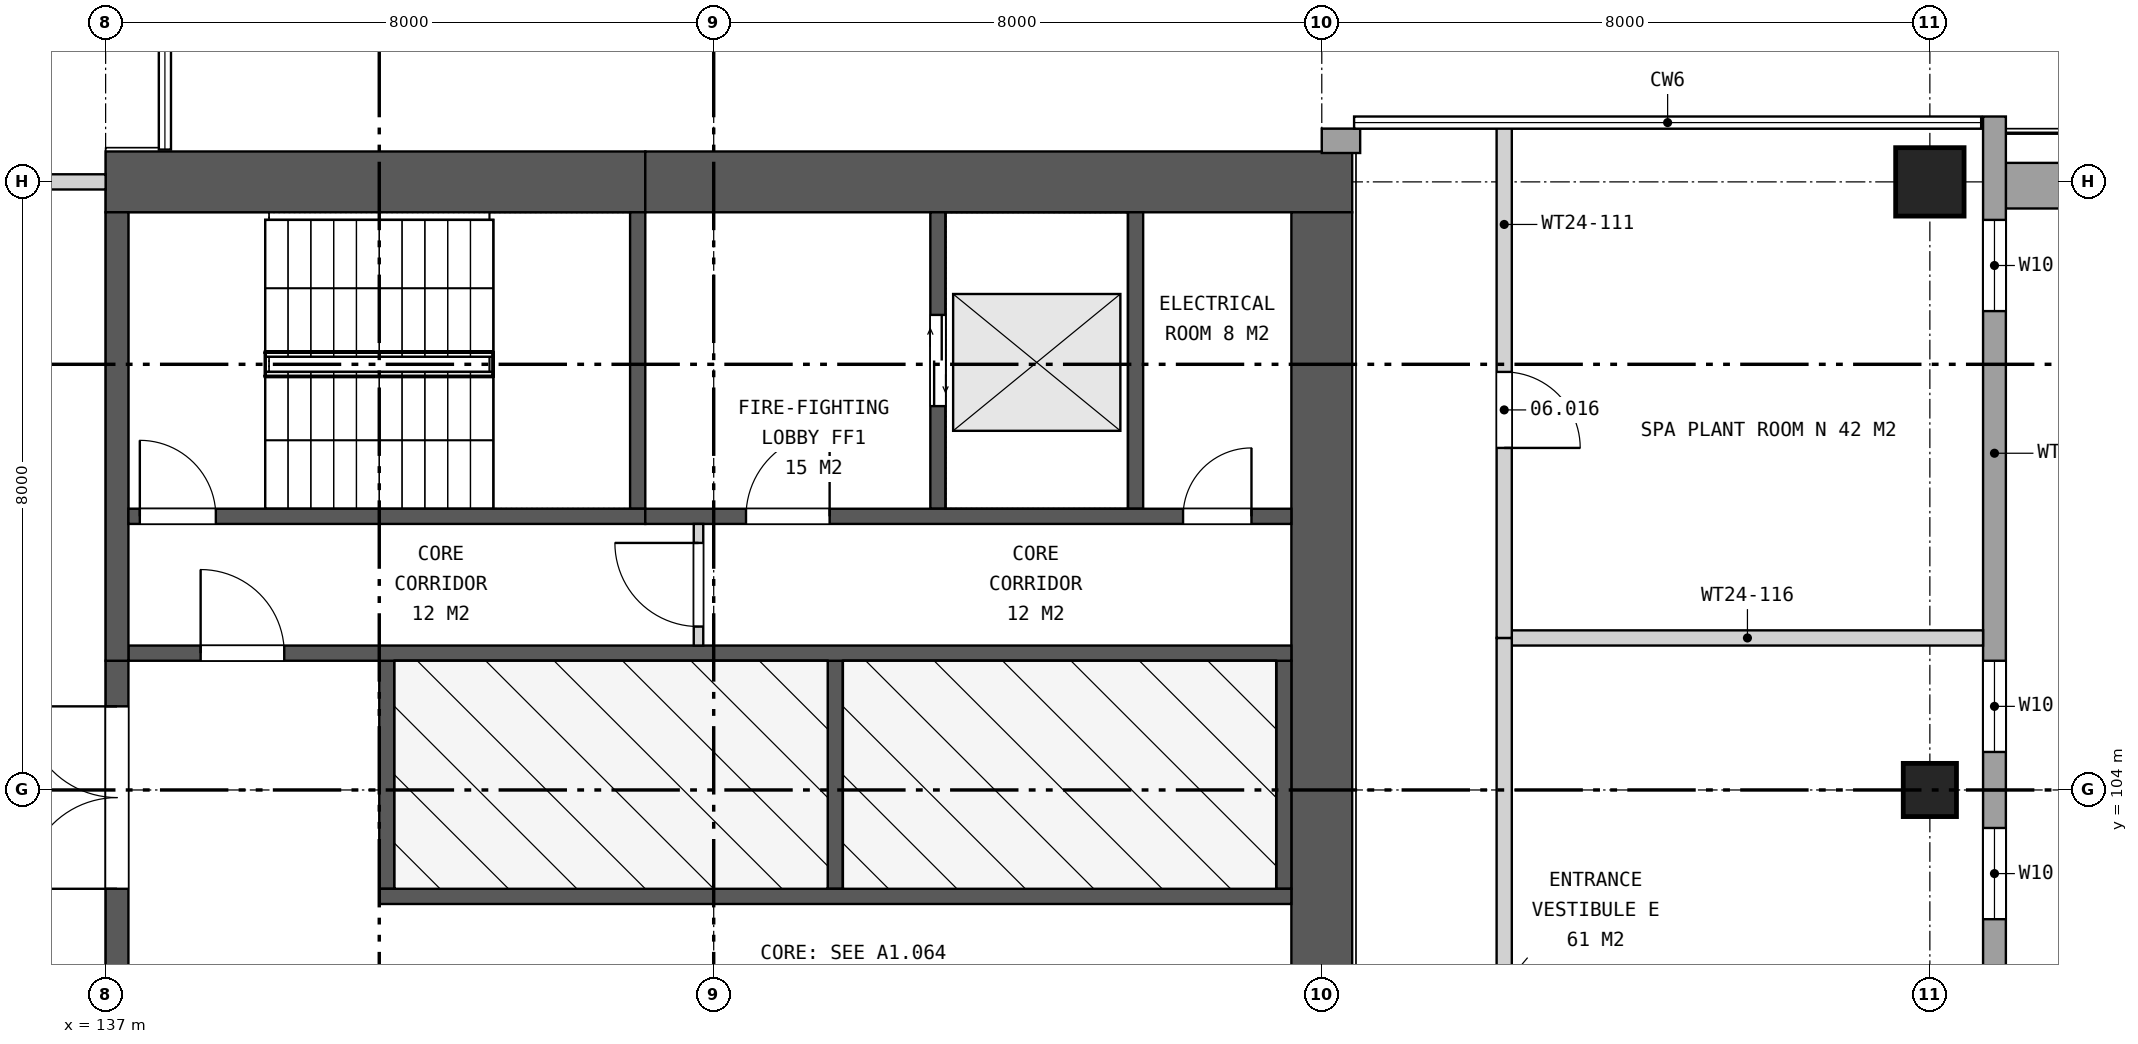
"""IFC4 building model, lengths in metres.
Left out: names, types, materials, properties, quantities, classifications, styles, units other than length and angle.
Written with IfcOpenShell. Run it as: python <this file> out.ifc"""

import sys

from ifc_helpers import new_model, si_unit, direction, frame, frame_2d, origin, origin_2d, place, context, subcontext, project, spatial, rectangle, extrude, element, fill, save


model = new_model("IFC4")
c1 = context("Model", 3, precision=1e-05, world=origin(), true_north=direction((0.0, 1.0)))
c2 = subcontext(c1, "Body", "Model", "MODEL_VIEW")
j1 = project(units=[si_unit("LENGTHUNIT", "METRE"), si_unit("PLANEANGLEUNIT", "RADIAN")], contexts=[c1])
p1 = place(None, origin())
s1 = spatial("IfcSite", under=j1, at=p1, CompositionType="ELEMENT")
p2 = place(p1, origin())
s2 = spatial("IfcBuilding", under=s1, at=p2, CompositionType="ELEMENT")
p3 = place(p2, frame((0.0, 0.0, 47.5)))
s3 = spatial("IfcBuildingStorey", under=s2, at=p3, CompositionType="ELEMENT", Elevation=47.5)
p4 = place(p3, frame((161.0, 112.0, 0.0), z_axis=(0.0, 0.0, 1.0), x_axis=(1.0, 0.0, 0.0)))
e1 = element("IfcColumn", 1, at=p4, inside=s3, PredefinedType="COLUMN", context=c2, shape_type="SweptSolid", body=[
    extrude(rectangle(XDim=0.9, YDim=0.9, at=origin_2d()), origin(), (0.0, 0.0, 1.0), 6.0),
])
p5 = place(p3, frame((161.0, 104.0, 5.2), z_axis=(0.0, 0.0, 1.0), x_axis=(1.0, 0.0, 0.0)))
e2 = element("IfcColumn", 2, at=p5, inside=s3, PredefinedType="COLUMN", context=c2, shape_type="SweptSolid", body=[
    extrude(rectangle(XDim=0.7, YDim=0.7, at=origin_2d()), origin(), (0.0, 0.0, 1.0), 0.8),
])
p6 = place(p3, frame((137.0, 112.0, 0.0), z_axis=(0.0, 0.0, 1.0), x_axis=(1.0, 0.0, 0.0)))
e3 = element("IfcWall", 3, at=p6, inside=s3, PredefinedType="SHEAR", context=c2, shape_type="SweptSolid", body=[
    extrude(rectangle(XDim=7.1, YDim=0.8, at=frame_2d((3.55, 0.0))), origin(), (0.0, 0.0, 1.0), 6.0),
])
p7 = place(p3, frame((144.1, 112.0, 0.0), z_axis=(0.0, 0.0, 1.0), x_axis=(1.0, 0.0, 0.0)))
e4 = element("IfcWall", 4, at=p7, inside=s3, PredefinedType="SHEAR", context=c2, shape_type="SweptSolid", body=[
    extrude(rectangle(XDim=9.3, YDim=0.8, at=frame_2d((4.65, 0.0))), origin(), (0.0, 0.0, 1.0), 6.0),
])
p8 = place(p3, frame((153.0, 88.4, 0.0), z_axis=(0.0, 0.0, 1.0), x_axis=(0.0, 1.0, 0.0)))
e5 = element("IfcWall", 5, at=p8, inside=s3, PredefinedType="SHEAR", context=c2, shape_type="SweptSolid", body=[
    extrude(rectangle(XDim=23.2, YDim=0.8, at=frame_2d((11.6, 0.0))), origin(), (0.0, 0.0, 1.0), 6.0),
])
p9 = place(p8, frame((10.4, 0.0, 0.0)))
e6 = element("IfcOpeningElement", 6, at=p9, cuts=e5, PredefinedType="OPENING", context=c2, shape_type="SweptSolid", body=[
    extrude(rectangle(XDim=2.4, YDim=2.4, at=frame_2d((1.2, 1.2))), frame((0.0, 0.41, 0.0), z_axis=(0.0, -1.0, 0.0), x_axis=(1.0, 0.0, 0.0)), (0.0, 0.0, 1.0), 0.82),
])
p10 = place(p3, frame((137.15, 94.3, 0.0), z_axis=(0.0, 0.0, 1.0), x_axis=(0.0, 1.0, 0.0)))
e7 = element("IfcWall", 7, at=p10, inside=s3, PredefinedType="SHEAR", context=c2, shape_type="SweptSolid", body=[
    extrude(rectangle(XDim=11.4, YDim=0.3, at=frame_2d((5.7, 0.0))), origin(), (0.0, 0.0, 1.0), 6.0),
])
p11 = place(p10, frame((0.6, 0.0, 0.0)))
e8 = element("IfcOpeningElement", 8, at=p11, cuts=e7, PredefinedType="OPENING", context=c2, shape_type="SweptSolid", body=[
    extrude(rectangle(XDim=2.4, YDim=2.4, at=frame_2d((1.2, 1.2))), frame((0.0, 0.16, 0.0), z_axis=(0.0, -1.0, 0.0), x_axis=(1.0, 0.0, 0.0)), (0.0, 0.0, 1.0), 0.32),
])
p12 = place(p10, frame((4.5, 0.0, 0.0)))
e9 = element("IfcOpeningElement", 9, at=p12, cuts=e7, PredefinedType="OPENING", context=c2, shape_type="SweptSolid", body=[
    extrude(rectangle(XDim=2.4, YDim=2.4, at=frame_2d((1.2, 1.2))), frame((0.0, 0.16, 0.0), z_axis=(0.0, -1.0, 0.0), x_axis=(1.0, 0.0, 0.0)), (0.0, 0.0, 1.0), 0.32),
])
p13 = place(p10, frame((8.4, 0.0, 0.0)))
e10 = element("IfcOpeningElement", 10, at=p13, cuts=e7, PredefinedType="OPENING", context=c2, shape_type="SweptSolid", body=[
    extrude(rectangle(XDim=2.4, YDim=2.4, at=frame_2d((1.2, 1.2))), frame((0.0, 0.16, 0.0), z_axis=(0.0, -1.0, 0.0), x_axis=(1.0, 0.0, 0.0)), (0.0, 0.0, 1.0), 0.32),
])
for number, where, z_axis, x_axis in (
    (11, (140.7, 102.7, 0.0), (0.0, 0.0, 1.0), (0.0, 1.0, 0.0)),
    (12, (146.6, 102.7, 0.0), (0.0, 0.0, 1.0), (0.0, 1.0, 0.0)),
    (13, (152.5, 102.7, 0.0), (0.0, 0.0, 1.0), (0.0, 1.0, 0.0)),
):
    element("IfcWall", number, at=place(p3, frame(where, z_axis=z_axis, x_axis=x_axis)), inside=s3, PredefinedType="SHEAR", context=c2, shape_type="SweptSolid", body=[
        extrude(rectangle(XDim=3.0, YDim=0.2, at=frame_2d((1.5, 0.0))), origin(), (0.0, 0.0, 1.0), 6.0),
    ])
p14 = place(p3, frame((140.6, 102.6, 0.0), z_axis=(0.0, 0.0, 1.0), x_axis=(1.0, 0.0, 0.0)))
e14 = element("IfcWall", 14, at=p14, inside=s3, PredefinedType="SHEAR", context=c2, shape_type="SweptSolid", body=[
    extrude(rectangle(XDim=12.0, YDim=0.2, at=frame_2d((6.0, 0.0))), origin(), (0.0, 0.0, 1.0), 6.0),
])
p15 = place(p3, frame((137.3, 105.8, 0.0), z_axis=(0.0, 0.0, 1.0), x_axis=(1.0, 0.0, 0.0)))
e15 = element("IfcWall", 15, at=p15, inside=s3, PredefinedType="SHEAR", context=c2, shape_type="SweptSolid", body=[
    extrude(rectangle(XDim=15.3, YDim=0.2, at=frame_2d((7.65, 0.0))), origin(), (0.0, 0.0, 1.0), 6.0),
])
p16 = place(p15, frame((0.95, 0.0, 0.0)))
e16 = element("IfcOpeningElement", 16, at=p16, cuts=e15, PredefinedType="OPENING", context=c2, shape_type="SweptSolid", body=[
    extrude(rectangle(XDim=1.1, YDim=2.1, at=frame_2d((0.55, 1.05))), frame((0.0, 0.11, 0.0), z_axis=(0.0, -1.0, 0.0), x_axis=(1.0, 0.0, 0.0)), (0.0, 0.0, 1.0), 0.22),
])
p17 = place(p3, frame((137.15, 105.7, 0.0), z_axis=(0.0, 0.0, 1.0), x_axis=(0.0, 1.0, 0.0)))
e17 = element("IfcWall", 17, at=p17, inside=s3, PredefinedType="SHEAR", context=c2, shape_type="SweptSolid", body=[
    extrude(rectangle(XDim=5.9, YDim=0.3, at=frame_2d((2.95, 0.0))), origin(), (0.0, 0.0, 1.0), 6.0),
])
p18 = place(p3, frame((144.0, 107.7, 0.0), z_axis=(0.0, 0.0, 1.0), x_axis=(0.0, 1.0, 0.0)))
e18 = element("IfcWall", 18, at=p18, inside=s3, PredefinedType="SHEAR", context=c2, shape_type="SweptSolid", body=[
    extrude(rectangle(XDim=3.9, YDim=0.2, at=frame_2d((1.95, 0.0))), origin(), (0.0, 0.0, 1.0), 6.0),
])
p19 = place(p3, frame((147.95, 107.7, 0.0), z_axis=(0.0, 0.0, 1.0), x_axis=(0.0, 1.0, 0.0)))
e19 = element("IfcWall", 19, at=p19, inside=s3, PredefinedType="SHEAR", context=c2, shape_type="SweptSolid", body=[
    extrude(rectangle(XDim=3.9, YDim=0.2, at=frame_2d((1.95, 0.0))), origin(), (0.0, 0.0, 1.0), 6.0),
])
p20 = place(p19, frame((1.35, 0.0, 0.0)))
e20 = element("IfcOpeningElement", 20, at=p20, cuts=e19, PredefinedType="OPENING", context=c2, shape_type="SweptSolid", body=[
    extrude(rectangle(XDim=1.2, YDim=2.1, at=frame_2d((0.6, 1.05))), frame((0.0, 0.11, 0.0), z_axis=(0.0, -1.0, 0.0), x_axis=(1.0, 0.0, 0.0)), (0.0, 0.0, 1.0), 0.22),
])
p21 = place(p3, frame((150.55, 107.7, 0.0), z_axis=(0.0, 0.0, 1.0), x_axis=(0.0, 1.0, 0.0)))
e21 = element("IfcWall", 21, at=p21, inside=s3, PredefinedType="SHEAR", context=c2, shape_type="SweptSolid", body=[
    extrude(rectangle(XDim=3.9, YDim=0.2, at=frame_2d((1.95, 0.0))), origin(), (0.0, 0.0, 1.0), 6.0),
])
p22 = place(p3, frame((137.3, 107.6, 0.0), z_axis=(0.0, 0.0, 1.0), x_axis=(1.0, 0.0, 0.0)))
e22 = element("IfcWall", 22, at=p22, inside=s3, PredefinedType="SHEAR", context=c2, shape_type="SweptSolid", body=[
    extrude(rectangle(XDim=6.8, YDim=0.2, at=frame_2d((3.4, 0.0))), origin(), (0.0, 0.0, 1.0), 6.0),
])
p23 = place(p22, frame((0.15, 0.0, 0.0)))
e23 = element("IfcOpeningElement", 23, at=p23, cuts=e22, PredefinedType="OPENING", context=c2, shape_type="SweptSolid", body=[
    extrude(rectangle(XDim=1.0, YDim=2.1, at=frame_2d((0.5, 1.05))), frame((0.0, 0.11, 0.0), z_axis=(0.0, -1.0, 0.0), x_axis=(1.0, 0.0, 0.0)), (0.0, 0.0, 1.0), 0.22),
])
p24 = place(p3, frame((144.1, 107.6, 0.0), z_axis=(0.0, 0.0, 1.0), x_axis=(1.0, 0.0, 0.0)))
e24 = element("IfcWall", 24, at=p24, inside=s3, PredefinedType="SHEAR", context=c2, shape_type="SweptSolid", body=[
    extrude(rectangle(XDim=8.5, YDim=0.2, at=frame_2d((4.25, 0.0))), origin(), (0.0, 0.0, 1.0), 6.0),
])
p25 = place(p24, frame((1.325, 0.0, 0.0)))
e25 = element("IfcOpeningElement", 25, at=p25, cuts=e24, PredefinedType="OPENING", context=c2, shape_type="SweptSolid", body=[
    extrude(rectangle(XDim=1.1, YDim=2.1, at=frame_2d((0.55, 1.05))), frame((0.0, 0.11, 0.0), z_axis=(0.0, -1.0, 0.0), x_axis=(1.0, 0.0, 0.0)), (0.0, 0.0, 1.0), 0.22),
])
p26 = place(p24, frame((7.075, 0.0, 0.0)))
e26 = element("IfcOpeningElement", 26, at=p26, cuts=e24, PredefinedType="OPENING", context=c2, shape_type="SweptSolid", body=[
    extrude(rectangle(XDim=0.9, YDim=2.1, at=frame_2d((0.45, 1.05))), frame((0.0, 0.11, 0.0), z_axis=(0.0, -1.0, 0.0), x_axis=(1.0, 0.0, 0.0)), (0.0, 0.0, 1.0), 0.22),
])
p27 = place(p3, frame((144.8, 105.9, 0.0), z_axis=(0.0, 0.0, 1.0), x_axis=(0.0, 1.0, 0.0)))
e27 = element("IfcWall", 27, at=p27, inside=s3, PredefinedType="PARTITIONING", context=c2, shape_type="SweptSolid", body=[
    extrude(rectangle(XDim=1.6, YDim=0.125, at=frame_2d((0.8, 0.0))), origin(), (0.0, 0.0, 1.0), 6.0),
])
p28 = place(p27, frame((0.25, 0.0, 0.0)))
e28 = element("IfcOpeningElement", 28, at=p28, cuts=e27, PredefinedType="OPENING", context=c2, shape_type="SweptSolid", body=[
    extrude(rectangle(XDim=1.1, YDim=2.1, at=frame_2d((0.55, 1.05))), frame((0.0, 0.073, 0.0), z_axis=(0.0, -1.0, 0.0), x_axis=(1.0, 0.0, 0.0)), (0.0, 0.0, 1.0), 0.145),
])
p29 = place(p3, frame((162.0, 111.95, 0.0), z_axis=(0.0, 0.0, 1.0), x_axis=(1.0, 0.0, 0.0)))
e29 = element("IfcWall", 29, at=p29, inside=s3, PredefinedType="SOLIDWALL", context=c2, shape_type="SweptSolid", body=[
    extrude(rectangle(XDim=7.25, YDim=0.6, at=frame_2d((3.625, 0.0))), origin(), (0.0, 0.0, 1.0), 0.6),
])
p30 = place(p3, frame((161.85, 96.0, 0.0), z_axis=(0.0, 0.0, 1.0), x_axis=(0.0, 1.0, 0.0)))
e30 = element("IfcWall", 30, at=p30, inside=s3, PredefinedType="SOLIDWALL", context=c2, shape_type="SweptSolid", body=[
    extrude(rectangle(XDim=8.0, YDim=0.3, at=frame_2d((4.0, 0.0))), origin(), (0.0, 0.0, 1.0), 5.256),
])
p31 = place(p30, frame((2.8, 0.0, 0.0)))
e31 = element("IfcOpeningElement", 31, at=p31, cuts=e30, PredefinedType="OPENING", context=c2, shape_type="SweptSolid", body=[
    extrude(rectangle(XDim=2.4, YDim=2.4, at=frame_2d((1.2, 1.2))), frame((0.0, 0.16, 0.0), z_axis=(0.0, -1.0, 0.0), x_axis=(1.0, 0.0, 0.0)), (0.0, 0.0, 1.0), 0.32),
])
p32 = place(p30, frame((0.5, 0.0, 0.4)))
e32 = element("IfcOpeningElement", 32, at=p32, cuts=e30, PredefinedType="OPENING", context=c2, shape_type="SweptSolid", body=[
    extrude(rectangle(XDim=1.2, YDim=2.2, at=frame_2d((0.6, 1.1))), frame((0.0, 0.16, 0.0), z_axis=(0.0, -1.0, 0.0), x_axis=(1.0, 0.0, 0.0)), (0.0, 0.0, 1.0), 0.32),
])
p33 = place(p30, frame((6.3, 0.0, 0.4)))
e33 = element("IfcOpeningElement", 33, at=p33, cuts=e30, PredefinedType="OPENING", context=c2, shape_type="SweptSolid", body=[
    extrude(rectangle(XDim=1.2, YDim=2.2, at=frame_2d((0.6, 1.1))), frame((0.0, 0.16, 0.0), z_axis=(0.0, -1.0, 0.0), x_axis=(1.0, 0.0, 0.0)), (0.0, 0.0, 1.0), 0.32),
])
p34 = place(p3, frame((161.85, 104.0, 0.0), z_axis=(0.0, 0.0, 1.0), x_axis=(0.0, 1.0, 0.0)))
e34 = element("IfcWall", 34, at=p34, inside=s3, PredefinedType="SOLIDWALL", context=c2, shape_type="SweptSolid", body=[
    extrude(rectangle(XDim=8.86, YDim=0.3, at=frame_2d((4.43, 0.0))), origin(), (0.0, 0.0, 1.0), 5.256),
])
p35 = place(p34, frame((0.5, 0.0, 0.4)))
e35 = element("IfcOpeningElement", 35, at=p35, cuts=e34, PredefinedType="OPENING", context=c2, shape_type="SweptSolid", body=[
    extrude(rectangle(XDim=1.2, YDim=2.2, at=frame_2d((0.6, 1.1))), frame((0.0, 0.16, 0.0), z_axis=(0.0, -1.0, 0.0), x_axis=(1.0, 0.0, 0.0)), (0.0, 0.0, 1.0), 0.32),
])
p36 = place(p34, frame((6.3, 0.0, 0.4)))
e36 = element("IfcOpeningElement", 36, at=p36, cuts=e34, PredefinedType="OPENING", context=c2, shape_type="SweptSolid", body=[
    extrude(rectangle(XDim=1.2, YDim=2.2, at=frame_2d((0.6, 1.1))), frame((0.0, 0.16, 0.0), z_axis=(0.0, -1.0, 0.0), x_axis=(1.0, 0.0, 0.0)), (0.0, 0.0, 1.0), 0.32),
])
p37 = place(p3, frame((153.0, 112.54, 0.0), z_axis=(0.0, 0.0, 1.0), x_axis=(1.0, 0.0, 0.0)))
e37 = element("IfcWall", 37, at=p37, inside=s3, PredefinedType="SOLIDWALL", context=c2, shape_type="SweptSolid", body=[
    extrude(rectangle(XDim=0.505, YDim=0.32, at=frame_2d((0.252, 0.0))), origin(), (0.0, 0.0, 1.0), 5.72),
])
p38 = place(p3, frame((155.5, 106.0, 0.0), z_axis=(0.0, 0.0, 1.0), x_axis=(1.0, 0.0, 0.0)))
e38 = element("IfcWall", 38, at=p38, inside=s3, PredefinedType="SOLIDWALL", context=c2, shape_type="SweptSolid", body=[
    extrude(rectangle(XDim=6.2, YDim=0.2, at=frame_2d((3.1, 0.0))), origin(), (0.0, 0.0, 1.0), 2.7),
])
p39 = place(p3, frame((129.6, 112.0, 0.0), z_axis=(0.0, 0.0, 1.0), x_axis=(1.0, 0.0, 0.0)))
e39 = element("IfcWall", 39, at=p39, inside=s3, PredefinedType="PARTITIONING", context=c2, shape_type="SweptSolid", body=[
    extrude(rectangle(XDim=7.4, YDim=0.2, at=frame_2d((3.7, 0.0))), origin(), (0.0, 0.0, 1.0), 5.256),
])
p40 = place(p39, frame((2.5, 0.0, 0.0)))
e40 = element("IfcOpeningElement", 40, at=p40, cuts=e39, PredefinedType="OPENING", context=c2, shape_type="SweptSolid", body=[
    extrude(rectangle(XDim=1.8, YDim=2.4, at=frame_2d((0.9, 1.2))), frame((0.0, 0.11, 0.0), z_axis=(0.0, -1.0, 0.0), x_axis=(1.0, 0.0, 0.0)), (0.0, 0.0, 1.0), 0.22),
])
p41 = place(p3, frame((155.4, 94.0, 0.0), z_axis=(0.0, 0.0, 1.0), x_axis=(0.0, 1.0, 0.0)))
e41 = element("IfcWall", 41, at=p41, inside=s3, PredefinedType="PARTITIONING", context=c2, shape_type="SweptSolid", body=[
    extrude(rectangle(XDim=12.0, YDim=0.2, at=frame_2d((6.0, 0.0))), origin(), (0.0, 0.0, 1.0), 5.256),
])
p42 = place(p41, frame((5.1, 0.0, 0.0)))
e42 = element("IfcOpeningElement", 42, at=p42, cuts=e41, PredefinedType="OPENING", context=c2, shape_type="SweptSolid", body=[
    extrude(rectangle(XDim=1.8, YDim=2.4, at=frame_2d((0.9, 1.2))), frame((0.0, 0.11, 0.0), z_axis=(0.0, -1.0, 0.0), x_axis=(1.0, 0.0, 0.0)), (0.0, 0.0, 1.0), 0.22),
])
p43 = place(p3, frame((155.4, 106.0, 0.0), z_axis=(0.0, 0.0, 1.0), x_axis=(0.0, 1.0, 0.0)))
e43 = element("IfcWall", 43, at=p43, inside=s3, PredefinedType="SOLIDWALL", context=c2, shape_type="SweptSolid", body=[
    extrude(rectangle(XDim=6.8, YDim=0.2, at=frame_2d((3.4, 0.0))), origin(), (0.0, 0.0, 1.0), 5.263),
])
p44 = place(p43, frame((2.5, 0.0, 0.0)))
e44 = element("IfcOpeningElement", 44, at=p44, cuts=e43, PredefinedType="OPENING", context=c2, shape_type="SweptSolid", body=[
    extrude(rectangle(XDim=1.0, YDim=2.2, at=frame_2d((0.5, 1.1))), frame((0.0, 0.11, 0.0), z_axis=(0.0, -1.0, 0.0), x_axis=(1.0, 0.0, 0.0)), (0.0, 0.0, 1.0), 0.22),
])
p45 = place(p13, origin())
e45 = element("IfcDoor", 45, at=p45, inside=s3, OperationType="DOUBLE_DOOR_SINGLE_SWING", PredefinedType="DOOR", context=c2, shape_type="SweptSolid", body=[
    extrude(rectangle(XDim=2.4, YDim=2.4, at=frame_2d((1.2, 1.2))), frame((0.0, 0.025, 0.0), z_axis=(0.0, -1.0, 0.0), x_axis=(1.0, 0.0, 0.0)), (0.0, 0.0, 1.0), 0.05),
])
fill(e10, e45)
p46 = place(p16, origin())
e46 = element("IfcDoor", 46, at=p46, inside=s3, OperationType="SINGLE_SWING_LEFT", PredefinedType="DOOR", context=c2, shape_type="SweptSolid", body=[
    extrude(rectangle(XDim=1.1, YDim=2.1, at=frame_2d((0.55, 1.05))), frame((0.0, 0.025, 0.0), z_axis=(0.0, -1.0, 0.0), x_axis=(1.0, 0.0, 0.0)), (0.0, 0.0, 1.0), 0.05),
])
fill(e16, e46)
p47 = place(p20, origin())
e47 = element("IfcDoor", 47, at=p47, inside=s3, OperationType="DOUBLE_DOOR_SLIDING", PredefinedType="DOOR", context=c2, shape_type="SweptSolid", body=[
    extrude(rectangle(XDim=1.2, YDim=2.1, at=frame_2d((0.6, 1.05))), frame((0.0, 0.025, 0.0), z_axis=(0.0, -1.0, 0.0), x_axis=(1.0, 0.0, 0.0)), (0.0, 0.0, 1.0), 0.05),
])
fill(e20, e47)
p48 = place(p23, origin())
e48 = element("IfcDoor", 48, at=p48, inside=s3, OperationType="SINGLE_SWING_LEFT", PredefinedType="DOOR", context=c2, shape_type="SweptSolid", body=[
    extrude(rectangle(XDim=1.0, YDim=2.1, at=frame_2d((0.5, 1.05))), frame((0.0, 0.025, 0.0), z_axis=(0.0, -1.0, 0.0), x_axis=(1.0, 0.0, 0.0)), (0.0, 0.0, 1.0), 0.05),
])
fill(e23, e48)
p49 = place(p25, origin())
e49 = element("IfcDoor", 49, at=p49, inside=s3, OperationType="SINGLE_SWING_RIGHT", PredefinedType="DOOR", context=c2, shape_type="SweptSolid", body=[
    extrude(rectangle(XDim=1.1, YDim=2.1, at=frame_2d((0.55, 1.05))), frame((0.0, 0.025, 0.0), z_axis=(0.0, -1.0, 0.0), x_axis=(1.0, 0.0, 0.0)), (0.0, 0.0, 1.0), 0.05),
])
fill(e25, e49)
p50 = place(p26, origin())
e50 = element("IfcDoor", 50, at=p50, inside=s3, OperationType="SINGLE_SWING_RIGHT", PredefinedType="DOOR", context=c2, shape_type="SweptSolid", body=[
    extrude(rectangle(XDim=0.9, YDim=2.1, at=frame_2d((0.45, 1.05))), frame((0.0, 0.025, 0.0), z_axis=(0.0, -1.0, 0.0), x_axis=(1.0, 0.0, 0.0)), (0.0, 0.0, 1.0), 0.05),
])
fill(e26, e50)
p51 = place(p28, origin())
e51 = element("IfcDoor", 51, at=p51, inside=s3, OperationType="SINGLE_SWING_RIGHT", PredefinedType="DOOR", context=c2, shape_type="SweptSolid", body=[
    extrude(rectangle(XDim=1.1, YDim=2.1, at=frame_2d((0.55, 1.05))), frame((0.0, 0.025, 0.0), z_axis=(0.0, -1.0, 0.0), x_axis=(1.0, 0.0, 0.0)), (0.0, 0.0, 1.0), 0.05),
])
fill(e28, e51)
p52 = place(p33, origin())
e52 = element("IfcWindow", 52, at=p52, inside=s3, PartitioningType="SINGLE_PANEL", PredefinedType="WINDOW", context=c2, shape_type="SweptSolid", body=[
    extrude(rectangle(XDim=1.2, YDim=2.2, at=frame_2d((0.6, 1.1))), frame((0.0, 0.03, 0.0), z_axis=(0.0, -1.0, 0.0), x_axis=(1.0, 0.0, 0.0)), (0.0, 0.0, 1.0), 0.06),
])
fill(e33, e52)
p53 = place(p35, origin())
e53 = element("IfcWindow", 53, at=p53, inside=s3, PartitioningType="SINGLE_PANEL", PredefinedType="WINDOW", context=c2, shape_type="SweptSolid", body=[
    extrude(rectangle(XDim=1.2, YDim=2.2, at=frame_2d((0.6, 1.1))), frame((0.0, 0.03, 0.0), z_axis=(0.0, -1.0, 0.0), x_axis=(1.0, 0.0, 0.0)), (0.0, 0.0, 1.0), 0.06),
])
fill(e35, e53)
p54 = place(p36, origin())
e54 = element("IfcWindow", 54, at=p54, inside=s3, PartitioningType="SINGLE_PANEL", PredefinedType="WINDOW", context=c2, shape_type="SweptSolid", body=[
    extrude(rectangle(XDim=1.2, YDim=2.2, at=frame_2d((0.6, 1.1))), frame((0.0, 0.03, 0.0), z_axis=(0.0, -1.0, 0.0), x_axis=(1.0, 0.0, 0.0)), (0.0, 0.0, 1.0), 0.06),
])
fill(e36, e54)
p55 = place(p44, frame((1.0, 0.0, 0.0), z_axis=(0.0, 0.0, 1.0), x_axis=(-1.0, 0.0, 0.0)))
e55 = element("IfcDoor", 55, at=p55, inside=s3, OperationType="SINGLE_SWING_RIGHT", PredefinedType="DOOR", context=c2, shape_type="SweptSolid", body=[
    extrude(rectangle(XDim=1.0, YDim=2.2, at=frame_2d((0.5, 1.1))), frame((0.0, 0.025, 0.0), z_axis=(0.0, -1.0, 0.0), x_axis=(1.0, 0.0, 0.0)), (0.0, 0.0, 1.0), 0.05),
])
fill(e44, e55)
save(model, sys.argv[1])
